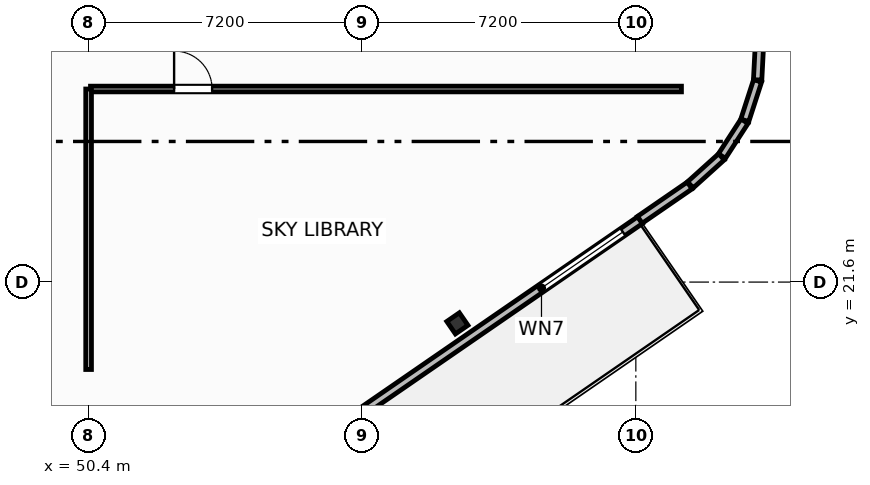
"""IFC4 building model, lengths in metres.
Left out: names, types, materials, properties, quantities, classifications, styles, units other than length and angle.
Written with IfcOpenShell. Run it as: python <this file> out.ifc"""

import sys

from ifc_helpers import new_model, si_unit, direction, frame, frame_2d, origin, origin_2d, place, context, subcontext, project, spatial, rectangle, i_section, extrude, element, fill, save


model = new_model("IFC4")
c1 = context("Model", 3, precision=1e-05, world=origin(), true_north=direction((0.0, 1.0)))
c2 = subcontext(c1, "Body", "Model", "MODEL_VIEW")
j1 = project(units=[si_unit("LENGTHUNIT", "METRE"), si_unit("PLANEANGLEUNIT", "RADIAN")], contexts=[c1])
p1 = place(None, origin())
s1 = spatial("IfcSite", under=j1, at=p1, CompositionType="ELEMENT")
p2 = place(p1, origin())
s2 = spatial("IfcBuilding", under=s1, at=p2, CompositionType="ELEMENT")
p3 = place(p2, frame((0.0, 0.0, 296.3)))
s3 = spatial("IfcBuildingStorey", under=s2, at=p3, CompositionType="ELEMENT", Elevation=296.3)
p4 = place(p3, frame((60.104, 20.514, -0.32), z_axis=(0.0, 0.0, 1.0), x_axis=(0.823532597628, 0.567268949127, 0.0)))
e1 = element("IfcColumn", 1, at=p4, inside=s3, PredefinedType="COLUMN", context=c2, shape_type="SweptSolid", body=[
    extrude(i_section(OverallWidth=0.401, OverallDepth=0.399, WebThickness=0.025, FlangeThickness=0.04, FilletRadius=0.022, at=origin_2d()), origin(), (0.0, 0.0, 1.0), 5.12),
])
p5 = place(p3, frame((64.912, 23.23, 0.0), z_axis=(0.0, 0.0, 1.0), x_axis=(-0.823534403617, -0.567266327275, 0.0)))
e2 = element("IfcWall", 2, at=p5, inside=s3, PredefinedType="SOLIDWALL", context=c2, shape_type="SweptSolid", body=[
    extrude(rectangle(XDim=40.0, YDim=0.22, at=frame_2d((20.0, 0.0))), origin(), (0.0, 0.0, 1.0), 3.83),
])
p6 = place(p5, frame((19.025, 0.0, 0.0)))
e3 = element("IfcOpeningElement", 3, at=p6, cuts=e2, PredefinedType="OPENING", context=c2, shape_type="SweptSolid", body=[
    extrude(rectangle(XDim=1.95, YDim=2.35, at=frame_2d((0.975, 1.175))), frame((0.0, 0.12, 0.0), z_axis=(0.0, -1.0, 0.0), x_axis=(1.0, 0.0, 0.0)), (0.0, 0.0, 1.0), 0.24),
])
p7 = place(p5, frame((0.55, 0.0, 0.75)))
e4 = element("IfcOpeningElement", 4, at=p7, cuts=e2, PredefinedType="OPENING", context=c2, shape_type="SweptSolid", body=[
    extrude(rectangle(XDim=2.6, YDim=2.0, at=frame_2d((1.3, 1.0))), frame((0.0, 0.12, 0.0), z_axis=(0.0, -1.0, 0.0), x_axis=(1.0, 0.0, 0.0)), (0.0, 0.0, 1.0), 0.24),
])
p8 = place(p5, frame((36.85, 0.0, 0.75)))
e5 = element("IfcOpeningElement", 5, at=p8, cuts=e2, PredefinedType="OPENING", context=c2, shape_type="SweptSolid", body=[
    extrude(rectangle(XDim=2.6, YDim=2.0, at=frame_2d((1.3, 1.0))), frame((0.0, 0.12, 0.0), z_axis=(0.0, -1.0, 0.0), x_axis=(1.0, 0.0, 0.0)), (0.0, 0.0, 1.0), 0.24),
])
p9 = place(p3, frame((64.906, 23.238, 0.0), z_axis=(0.0, 0.0, 1.0), x_axis=(0.823509192795, 0.567302925589, 0.0)))
e6 = element("IfcWall", 6, at=p9, inside=s3, PredefinedType="SOLIDWALL", context=c2, shape_type="SweptSolid", body=[
    extrude(rectangle(XDim=1.592, YDim=0.22, at=frame_2d((0.796, 0.0))), origin(), (0.0, 0.0, 1.0), 3.83),
])
p10 = place(p3, frame((66.236, 24.158, 0.0), z_axis=(0.0, 0.0, 1.0), x_axis=(0.742465815116, 0.669883955163, 0.0)))
e7 = element("IfcWall", 7, at=p10, inside=s3, PredefinedType="SOLIDWALL", context=c2, shape_type="SweptSolid", body=[
    extrude(rectangle(XDim=1.1, YDim=0.22, at=frame_2d((0.55, 0.0))), origin(), (0.0, 0.0, 1.0), 3.83),
])
p11 = place(p3, frame((67.066, 24.916, 0.0), z_axis=(0.0, 0.0, 1.0), x_axis=(0.543714687717, 0.839270122405, 0.0)))
e8 = element("IfcWall", 8, at=p11, inside=s3, PredefinedType="SOLIDWALL", context=c2, shape_type="SweptSolid", body=[
    extrude(rectangle(XDim=1.092, YDim=0.22, at=frame_2d((0.546, 0.0))), origin(), (0.0, 0.0, 1.0), 3.83),
])
p12 = place(p3, frame((67.667, 25.856, 0.0), z_axis=(0.0, 0.0, 1.0), x_axis=(0.30803453742, 0.951375175079, 0.0)))
e9 = element("IfcWall", 9, at=p12, inside=s3, PredefinedType="SOLIDWALL", context=c2, shape_type="SweptSolid", body=[
    extrude(rectangle(XDim=1.092, YDim=0.22, at=frame_2d((0.546, 0.0))), origin(), (0.0, 0.0, 1.0), 3.83),
])
p13 = place(p3, frame((68.005, 26.92, 0.0), z_axis=(0.0, 0.0, 1.0), x_axis=(0.051197599359, 0.99868854295, 0.0)))
e10 = element("IfcWall", 10, at=p13, inside=s3, PredefinedType="SOLIDWALL", context=c2, shape_type="SweptSolid", body=[
    extrude(rectangle(XDim=1.092, YDim=0.22, at=frame_2d((0.546, 0.0))), origin(), (0.0, 0.0, 1.0), 3.83),
])
p14 = place(p3, frame((50.45, 26.68, 0.0), z_axis=(0.0, 0.0, 1.0), x_axis=(1.0, 0.0, 0.0)))
e11 = element("IfcWall", 11, at=p14, inside=s3, PredefinedType="PARTITIONING", context=c2, shape_type="SweptSolid", body=[
    extrude(rectangle(XDim=15.55, YDim=0.15, at=frame_2d((7.775, 0.0))), origin(), (0.0, 0.0, 1.0), 4.55),
])
p15 = place(p14, frame((2.2, 0.0, 0.0)))
e12 = element("IfcOpeningElement", 12, at=p15, cuts=e11, PredefinedType="OPENING", context=c2, shape_type="SweptSolid", body=[
    extrude(rectangle(XDim=1.0, YDim=2.05, at=frame_2d((0.5, 1.025))), frame((0.0, 0.085, 0.0), z_axis=(0.0, -1.0, 0.0), x_axis=(1.0, 0.0, 0.0)), (0.0, 0.0, 1.0), 0.17),
])
p16 = place(p3, frame((50.4, 19.3, 0.0), z_axis=(0.0, 0.0, 1.0), x_axis=(0.0, 1.0, 0.0)))
e13 = element("IfcWall", 13, at=p16, inside=s3, PredefinedType="PARTITIONING", context=c2, shape_type="SweptSolid", body=[
    extrude(rectangle(XDim=7.38, YDim=0.15, at=frame_2d((3.69, 0.0))), origin(), (0.0, 0.0, 1.0), 4.55),
])
p17 = place(p7, origin())
e14 = element("IfcWindow", 14, at=p17, inside=s3, PartitioningType="SINGLE_PANEL", PredefinedType="WINDOW", context=c2, shape_type="SweptSolid", body=[
    extrude(rectangle(XDim=2.6, YDim=2.0, at=frame_2d((1.3, 1.0))), frame((0.0, 0.03, 0.0), z_axis=(0.0, -1.0, 0.0), x_axis=(1.0, 0.0, 0.0)), (0.0, 0.0, 1.0), 0.06),
])
fill(e4, e14)
p18 = place(p15, origin())
e15 = element("IfcDoor", 15, at=p18, inside=s3, OperationType="SINGLE_SWING_LEFT", PredefinedType="DOOR", context=c2, shape_type="SweptSolid", body=[
    extrude(rectangle(XDim=1.0, YDim=2.05, at=frame_2d((0.5, 1.025))), frame((0.0, 0.025, 0.0), z_axis=(0.0, -1.0, 0.0), x_axis=(1.0, 0.0, 0.0)), (0.0, 0.0, 1.0), 0.05),
])
fill(e12, e15)
save(model, sys.argv[1])
